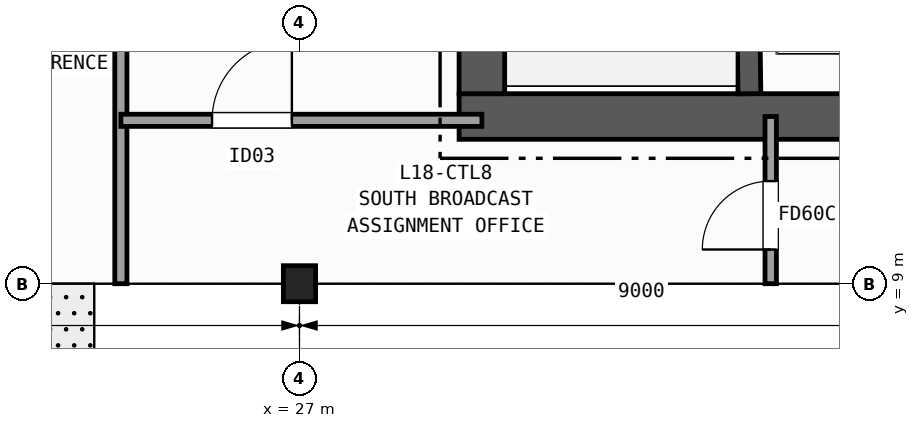
"""IFC4 building model, lengths in metres.
Left out: names, types, materials, properties, quantities, classifications, styles, units other than length and angle.
Written with IfcOpenShell. Run it as: python <this file> out.ifc"""

import sys

from ifc_helpers import new_model, si_unit, direction, frame, frame_2d, origin, origin_2d, place, context, subcontext, project, spatial, rectangle, i_section, extrude, element, fill, save


model = new_model("IFC4")
c1 = context("Model", 3, precision=1e-05, world=origin(), true_north=direction((0.0, 1.0)))
c2 = subcontext(c1, "Body", "Model", "MODEL_VIEW")
j1 = project(units=[si_unit("LENGTHUNIT", "METRE"), si_unit("PLANEANGLEUNIT", "RADIAN")], contexts=[c1])
p1 = place(None, origin())
s1 = spatial("IfcSite", under=j1, at=p1, CompositionType="ELEMENT")
p2 = place(p1, origin())
s2 = spatial("IfcBuilding", under=s1, at=p2, CompositionType="ELEMENT")
p3 = place(p2, frame((0.0, 0.0, 76.7)))
s3 = spatial("IfcBuildingStorey", under=s2, at=p3, CompositionType="ELEMENT", Elevation=76.7)
p4 = place(p3, frame((27.0, 9.0, 0.0), z_axis=(0.0, 0.0, 1.0), x_axis=(1.0, 0.0, 0.0)))
e1 = element("IfcColumn", 1, at=p4, inside=s3, PredefinedType="COLUMN", context=c2, shape_type="SweptSolid", body=[
    extrude(i_section(OverallWidth=0.424, OverallDepth=0.474, WebThickness=0.048, FlangeThickness=0.077, FilletRadius=0.015, at=origin_2d()), origin(), (0.0, 0.0, 1.0), 3.7),
])
p5 = place(p3, frame((29.1, 11.2, 0.0), z_axis=(0.0, 0.0, 1.0), x_axis=(1.0, 0.0, 0.0)))
e2 = element("IfcWall", 2, at=p5, inside=s3, PredefinedType="SHEAR", context=c2, shape_type="SweptSolid", body=[
    extrude(rectangle(XDim=14.0, YDim=0.6, at=frame_2d((7.0, 0.0))), origin(), (0.0, 0.0, 1.0), 3.42),
])
p6 = place(p3, frame((29.4, 24.3, 0.0), z_axis=(0.0, 0.0, 1.0), x_axis=(0.0, -1.0, 0.0)))
e3 = element("IfcWall", 3, at=p6, inside=s3, PredefinedType="SHEAR", context=c2, shape_type="SweptSolid", body=[
    extrude(rectangle(XDim=12.8, YDim=0.6, at=frame_2d((6.4, 0.0))), origin(), (0.0, 0.0, 1.0), 3.42),
])
p7 = place(p6, frame((1.4, 0.0, 0.0)))
e4 = element("IfcOpeningElement", 4, at=p7, cuts=e3, PredefinedType="OPENING", context=c2, shape_type="SweptSolid", body=[
    extrude(rectangle(XDim=1.35, YDim=2.15, at=frame_2d((0.675, 1.075))), frame((0.0, 0.31, 0.0), z_axis=(0.0, -1.0, 0.0), x_axis=(1.0, 0.0, 0.0)), (0.0, 0.0, 1.0), 0.62),
])
p8 = place(p3, frame((32.92, 11.5, 0.0), z_axis=(0.0, 0.0, 1.0), x_axis=(-0.013244407292, 0.999912288991, 0.0)))
e5 = element("IfcWall", 5, at=p8, inside=s3, PredefinedType="SHEAR", context=c2, shape_type="SweptSolid", body=[
    extrude(rectangle(XDim=9.051, YDim=0.3, at=frame_2d((4.525, 0.0))), origin(), (0.0, 0.0, 1.0), 3.42),
])
p9 = place(p3, frame((24.65, 9.0, 0.0), z_axis=(0.0, 0.0, 1.0), x_axis=(0.0, 1.0, 0.0)))
e6 = element("IfcWall", 6, at=p9, inside=s3, PredefinedType="PARTITIONING", context=c2, shape_type="SweptSolid", body=[
    extrude(rectangle(XDim=19.2, YDim=0.16, at=frame_2d((9.6, 0.0))), origin(), (0.0, 0.0, 1.0), 2.627),
])
p10 = place(p9, frame((12.2, 0.0, 0.0)))
e7 = element("IfcOpeningElement", 7, at=p10, cuts=e6, PredefinedType="OPENING", context=c2, shape_type="SweptSolid", body=[
    extrude(rectangle(XDim=1.2, YDim=2.15, at=frame_2d((0.6, 1.075))), frame((0.0, 0.09, 0.0), z_axis=(0.0, -1.0, 0.0), x_axis=(1.0, 0.0, 0.0)), (0.0, 0.0, 1.0), 0.18),
])
p11 = place(p9, frame((4.2, 0.0, 0.0)))
e8 = element("IfcOpeningElement", 8, at=p11, cuts=e6, PredefinedType="OPENING", context=c2, shape_type="SweptSolid", body=[
    extrude(rectangle(XDim=0.86, YDim=2.05, at=frame_2d((0.43, 1.025))), frame((0.0, 0.09, 0.0), z_axis=(0.0, -1.0, 0.0), x_axis=(1.0, 0.0, 0.0)), (0.0, 0.0, 1.0), 0.18),
])
p12 = place(p3, frame((24.65, 11.15, 0.0), z_axis=(0.0, 0.0, 1.0), x_axis=(1.0, 0.0, 0.0)))
e9 = element("IfcWall", 9, at=p12, inside=s3, PredefinedType="PARTITIONING", context=c2, shape_type="SweptSolid", body=[
    extrude(rectangle(XDim=4.75, YDim=0.16, at=frame_2d((2.375, 0.0))), origin(), (0.0, 0.0, 1.0), 2.792),
])
p13 = place(p12, frame((1.2, 0.0, 0.0)))
e10 = element("IfcOpeningElement", 10, at=p13, cuts=e9, PredefinedType="OPENING", context=c2, shape_type="SweptSolid", body=[
    extrude(rectangle(XDim=1.05, YDim=2.15, at=frame_2d((0.525, 1.075))), frame((0.0, 0.09, 0.0), z_axis=(0.0, -1.0, 0.0), x_axis=(1.0, 0.0, 0.0)), (0.0, 0.0, 1.0), 0.18),
])
p14 = place(p3, frame((33.2, 9.0, 0.0), z_axis=(0.0, 0.0, 1.0), x_axis=(0.0, 1.0, 0.0)))
e11 = element("IfcWall", 11, at=p14, inside=s3, PredefinedType="PARTITIONING", context=c2, shape_type="SweptSolid", body=[
    extrude(rectangle(XDim=2.2, YDim=0.15, at=frame_2d((1.1, 0.0))), origin(), (0.0, 0.0, 1.0), 2.627),
])
p15 = place(p14, frame((0.45, 0.0, 0.0)))
e12 = element("IfcOpeningElement", 12, at=p15, cuts=e11, PredefinedType="OPENING", context=c2, shape_type="SweptSolid", body=[
    extrude(rectangle(XDim=0.9, YDim=2.1, at=frame_2d((0.45, 1.05))), frame((0.0, 0.085, 0.0), z_axis=(0.0, -1.0, 0.0), x_axis=(1.0, 0.0, 0.0)), (0.0, 0.0, 1.0), 0.17),
])
p16 = place(p13, origin())
e13 = element("IfcDoor", 13, at=p16, inside=s3, OperationType="SINGLE_SWING_RIGHT", PredefinedType="DOOR", context=c2, shape_type="SweptSolid", body=[
    extrude(rectangle(XDim=1.05, YDim=2.15, at=frame_2d((0.525, 1.075))), frame((0.0, 0.025, 0.0), z_axis=(0.0, -1.0, 0.0), x_axis=(1.0, 0.0, 0.0)), (0.0, 0.0, 1.0), 0.05),
])
fill(e10, e13)
p17 = place(p15, origin())
e14 = element("IfcDoor", 14, at=p17, inside=s3, OperationType="SINGLE_SWING_LEFT", PredefinedType="DOOR", context=c2, shape_type="SweptSolid", body=[
    extrude(rectangle(XDim=0.9, YDim=2.1, at=frame_2d((0.45, 1.05))), frame((0.0, 0.025, 0.0), z_axis=(0.0, -1.0, 0.0), x_axis=(1.0, 0.0, 0.0)), (0.0, 0.0, 1.0), 0.05),
])
fill(e12, e14)
save(model, sys.argv[1])
